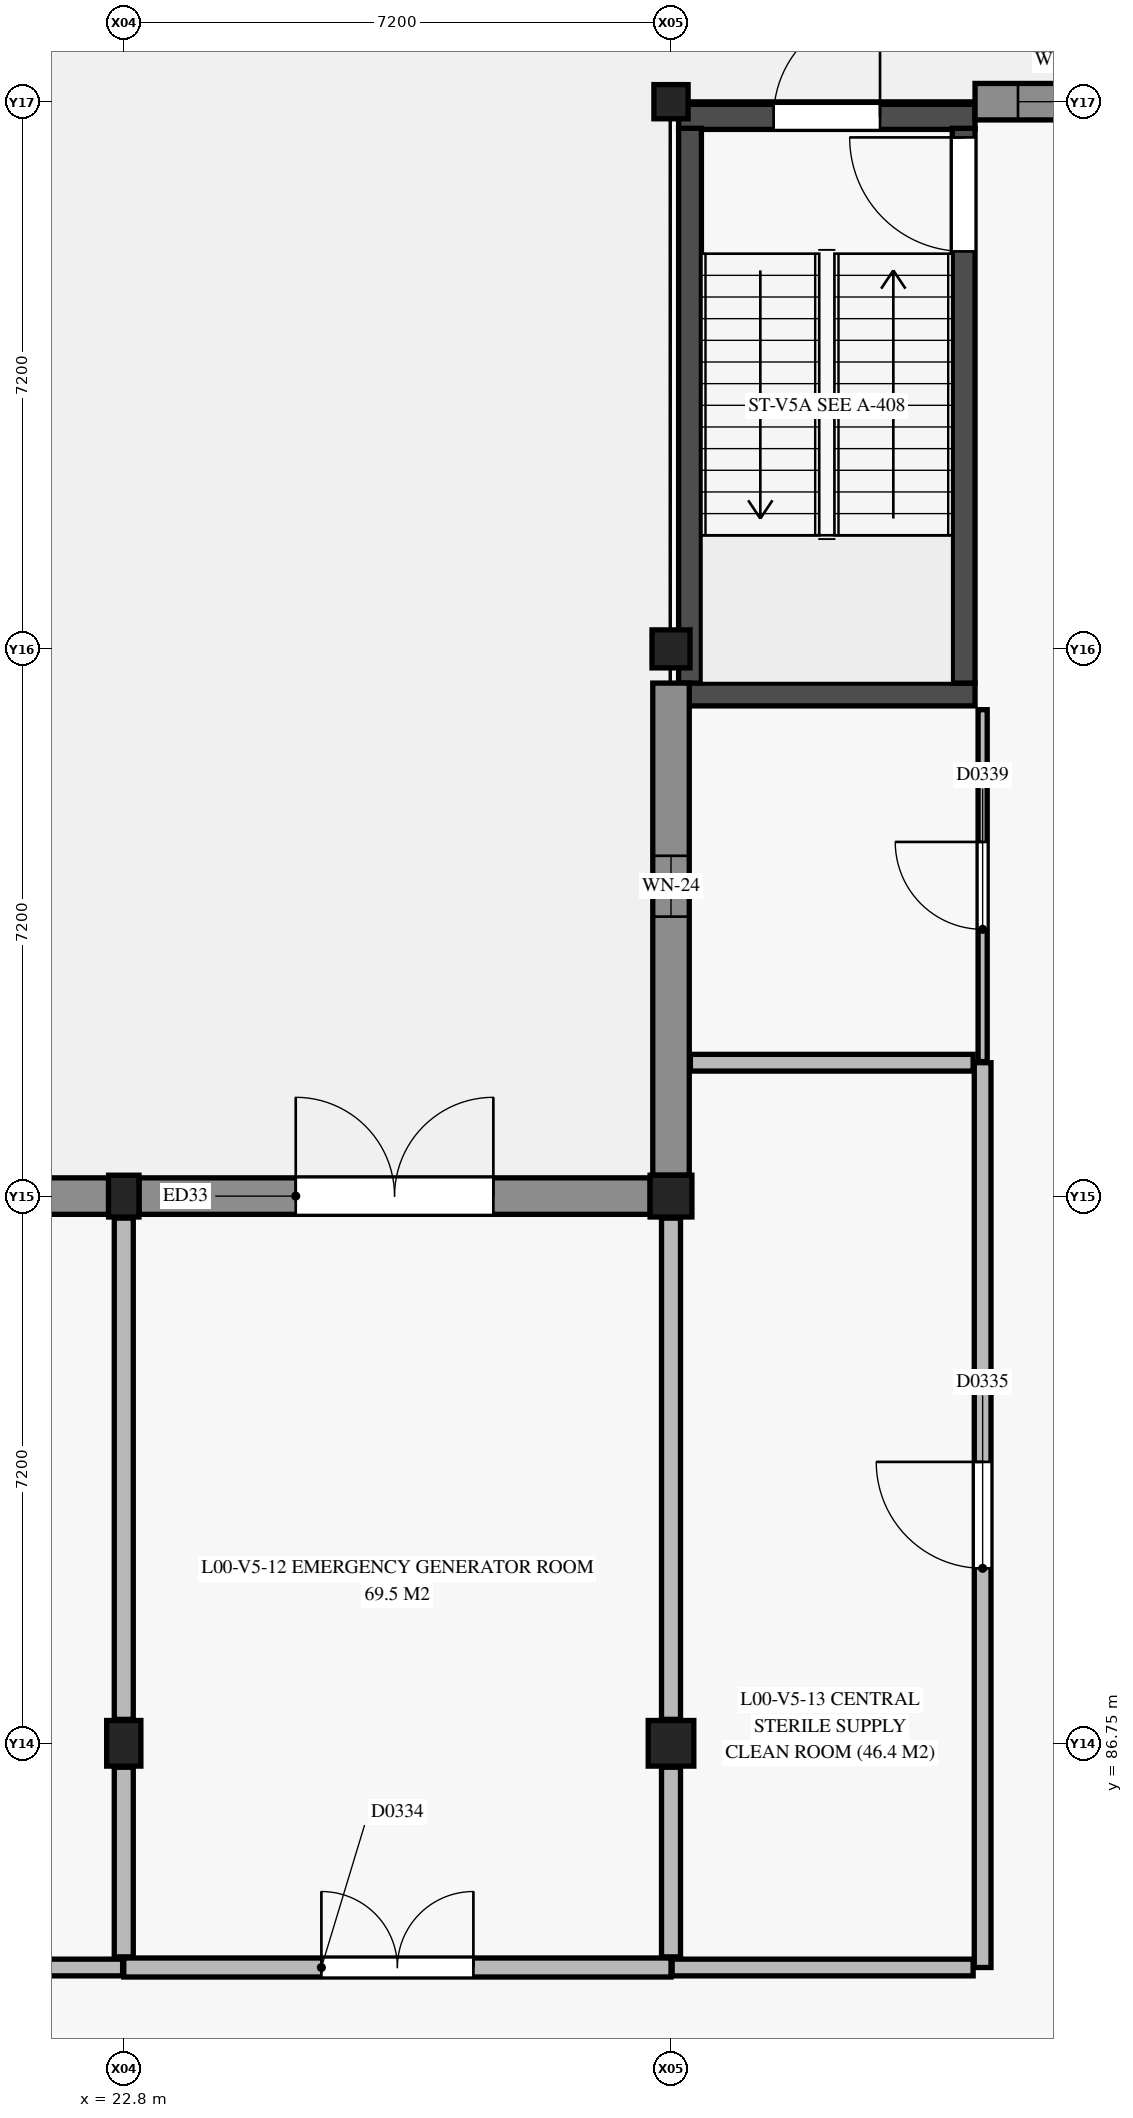
"""IFC4 building model, lengths in metres.
Left out: names, types, materials, properties, quantities, classifications, styles, units other than length and angle.
Written with IfcOpenShell. Run it as: python <this file> out.ifc"""

import sys

from ifc_helpers import new_model, si_unit, direction, frame, frame_2d, origin, origin_2d, place, context, subcontext, project, spatial, rectangle, extrude, element, fill, save


model = new_model("IFC4")
c1 = context("Model", 3, precision=1e-05, world=origin(), true_north=direction((0.0, 1.0)))
c2 = subcontext(c1, "Body", "Model", "MODEL_VIEW")
j1 = project(units=[si_unit("LENGTHUNIT", "METRE"), si_unit("PLANEANGLEUNIT", "RADIAN")], contexts=[c1])
p1 = place(None, origin())
s1 = spatial("IfcSite", under=j1, at=p1, CompositionType="ELEMENT")
p2 = place(p1, origin())
s2 = spatial("IfcBuilding", under=s1, at=p2, CompositionType="ELEMENT")
p3 = place(p2, origin())
s3 = spatial("IfcBuildingStorey", under=s2, at=p3, CompositionType="ELEMENT", Elevation=0.0)
p4 = place(p3, frame((22.8, 86.75, 0.0), z_axis=(0.0, 0.0, 1.0), x_axis=(1.0, 0.0, 0.0)))
e1 = element("IfcColumn", 1, at=p4, inside=s3, PredefinedType="COLUMN", context=c2, shape_type="SweptSolid", body=[
    extrude(rectangle(XDim=0.45, YDim=0.6, at=origin_2d()), origin(), (0.0, 0.0, 1.0), 4.8),
])
p5 = place(p3, frame((22.8, 93.95, 0.0), z_axis=(0.0, 0.0, 1.0), x_axis=(1.0, 0.0, 0.0)))
e2 = element("IfcColumn", 2, at=p5, inside=s3, PredefinedType="COLUMN", context=c2, shape_type="SweptSolid", body=[
    extrude(rectangle(XDim=0.4, YDim=0.55, at=origin_2d()), origin(), (0.0, 0.0, 1.0), 4.8),
])
p6 = place(p3, frame((30.0, 86.75, 0.0), z_axis=(0.0, 0.0, 1.0), x_axis=(1.0, 0.0, 0.0)))
e3 = element("IfcColumn", 3, at=p6, inside=s3, PredefinedType="COLUMN", context=c2, shape_type="SweptSolid", body=[
    extrude(rectangle(XDim=0.6, YDim=0.6, at=origin_2d()), origin(), (0.0, 0.0, 1.0), 4.8),
])
p7 = place(p3, frame((30.0, 93.95, 0.0), z_axis=(0.0, 0.0, 1.0), x_axis=(1.0, 0.0, 0.0)))
e4 = element("IfcColumn", 4, at=p7, inside=s3, PredefinedType="COLUMN", context=c2, shape_type="SweptSolid", body=[
    extrude(rectangle(XDim=0.55, YDim=0.55, at=origin_2d()), origin(), (0.0, 0.0, 1.0), 4.8),
])
p8 = place(p3, frame((30.0, 101.15, 0.0), z_axis=(0.0, 0.0, 1.0), x_axis=(1.0, 0.0, 0.0)))
e5 = element("IfcColumn", 5, at=p8, inside=s3, PredefinedType="COLUMN", context=c2, shape_type="SweptSolid", body=[
    extrude(rectangle(XDim=0.5, YDim=0.5, at=origin_2d()), origin(), (0.0, 0.0, 1.0), 4.8),
])
p9 = place(p3, frame((30.0, 108.35, 0.0), z_axis=(0.0, 0.0, 1.0), x_axis=(1.0, 0.0, 0.0)))
e6 = element("IfcColumn", 6, at=p9, inside=s3, PredefinedType="COLUMN", context=c2, shape_type="SweptSolid", body=[
    extrude(rectangle(XDim=0.45, YDim=0.45, at=origin_2d()), origin(), (0.0, 0.0, 1.0), 4.8),
])
p10 = place(p3, frame((30.1, 100.55, 0.0), z_axis=(0.0, 0.0, 1.0), x_axis=(1.0, 0.0, 0.0)))
e7 = element("IfcWall", 7, at=p10, inside=s3, PredefinedType="SHEAR", context=c2, shape_type="SweptSolid", body=[
    extrude(rectangle(XDim=3.9, YDim=0.3, at=frame_2d((1.95, 0.0))), origin(), (0.0, 0.0, 1.0), 4.52),
])
p11 = place(p3, frame((30.1, 108.15, 0.0), z_axis=(0.0, 0.0, 1.0), x_axis=(1.0, 0.0, 0.0)))
e8 = element("IfcWall", 8, at=p11, inside=s3, PredefinedType="SHEAR", context=c2, shape_type="SweptSolid", body=[
    extrude(rectangle(XDim=3.9, YDim=0.33, at=frame_2d((1.95, 0.0))), origin(), (0.0, 0.0, 1.0), 4.52),
])
p12 = place(p11, frame((1.25, 0.0, 0.0)))
e9 = element("IfcOpeningElement", 9, at=p12, cuts=e8, PredefinedType="OPENING", context=c2, shape_type="SweptSolid", body=[
    extrude(rectangle(XDim=1.4, YDim=2.25, at=frame_2d((0.7, 1.125))), frame((0.0, 0.175, 0.0), z_axis=(0.0, -1.0, 0.0), x_axis=(1.0, 0.0, 0.0)), (0.0, 0.0, 1.0), 0.35),
])
p13 = place(p3, frame((30.25, 100.7, 0.0), z_axis=(0.0, 0.0, 1.0), x_axis=(0.0, 1.0, 0.0)))
e10 = element("IfcWall", 10, at=p13, inside=s3, PredefinedType="SHEAR", context=c2, shape_type="SweptSolid", body=[
    extrude(rectangle(XDim=7.3, YDim=0.3, at=frame_2d((3.65, 0.0))), origin(), (0.0, 0.0, 1.0), 4.52),
])
p14 = place(p3, frame((33.85, 100.7, 0.0), z_axis=(0.0, 0.0, 1.0), x_axis=(0.0, 1.0, 0.0)))
e11 = element("IfcWall", 11, at=p14, inside=s3, PredefinedType="SHEAR", context=c2, shape_type="SweptSolid", body=[
    extrude(rectangle(XDim=7.3, YDim=0.3, at=frame_2d((3.65, 0.0))), origin(), (0.0, 0.0, 1.0), 4.52),
])
p15 = place(p14, frame((5.68, 0.0, 0.0)))
e12 = element("IfcOpeningElement", 12, at=p15, cuts=e11, PredefinedType="OPENING", context=c2, shape_type="SweptSolid", body=[
    extrude(rectangle(XDim=1.5, YDim=2.15, at=frame_2d((0.75, 1.075))), frame((0.0, 0.16, 0.0), z_axis=(0.0, -1.0, 0.0), x_axis=(1.0, 0.0, 0.0)), (0.0, 0.0, 1.0), 0.32),
])
p16 = place(p3, frame((15.825, 93.95, 0.0), z_axis=(0.0, 0.0, 1.0), x_axis=(1.0, 0.0, 0.0)))
e13 = element("IfcWall", 13, at=p16, inside=s3, PredefinedType="SOLIDWALL", context=c2, shape_type="SweptSolid", body=[
    extrude(rectangle(XDim=6.775, YDim=0.48, at=frame_2d((3.388, 0.0))), origin(), (0.0, 0.0, 1.0), 3.7),
])
p17 = place(p16, frame((2.188, 0.0, 0.9)))
e14 = element("IfcOpeningElement", 14, at=p17, cuts=e13, PredefinedType="OPENING", context=c2, shape_type="SweptSolid", body=[
    extrude(rectangle(XDim=2.4, YDim=0.9, at=frame_2d((1.2, 0.45))), frame((0.0, 0.25, 0.0), z_axis=(0.0, -1.0, 0.0), x_axis=(1.0, 0.0, 0.0)), (0.0, 0.0, 1.0), 0.5),
])
p18 = place(p3, frame((23.0, 93.95, 0.0), z_axis=(0.0, 0.0, 1.0), x_axis=(1.0, 0.0, 0.0)))
e15 = element("IfcWall", 15, at=p18, inside=s3, PredefinedType="SOLIDWALL", context=c2, shape_type="SweptSolid", body=[
    extrude(rectangle(XDim=6.725, YDim=0.48, at=frame_2d((3.363, 0.0))), origin(), (0.0, 0.0, 1.0), 3.7),
])
p19 = place(p18, frame((2.062, 0.0, 0.0)))
e16 = element("IfcOpeningElement", 16, at=p19, cuts=e15, PredefinedType="OPENING", context=c2, shape_type="SweptSolid", body=[
    extrude(rectangle(XDim=2.6, YDim=2.7, at=frame_2d((1.3, 1.35))), frame((0.0, 0.25, 0.0), z_axis=(0.0, -1.0, 0.0), x_axis=(1.0, 0.0, 0.0)), (0.0, 0.0, 1.0), 0.5),
])
p20 = place(p3, frame((30.0, 94.225, 0.0), z_axis=(0.0, 0.0, 1.0), x_axis=(0.0, 1.0, 0.0)))
e17 = element("IfcWall", 17, at=p20, inside=s3, PredefinedType="SOLIDWALL", context=c2, shape_type="SweptSolid", body=[
    extrude(rectangle(XDim=6.475, YDim=0.48, at=frame_2d((3.237, 0.0))), origin(), (0.0, 0.0, 1.0), 3.7),
])
p21 = place(p20, frame((3.403, 0.0, 0.6)))
e18 = element("IfcOpeningElement", 18, at=p21, cuts=e17, PredefinedType="OPENING", context=c2, shape_type="SweptSolid", body=[
    extrude(rectangle(XDim=0.8, YDim=2.6, at=frame_2d((0.4, 1.3))), frame((0.0, 0.25, 0.0), z_axis=(0.0, -1.0, 0.0), x_axis=(1.0, 0.0, 0.0)), (0.0, 0.0, 1.0), 0.5),
])
p22 = place(p3, frame((34.0, 108.35, 0.0), z_axis=(0.0, 0.0, 1.0), x_axis=(1.0, 0.0, 0.0)))
e19 = element("IfcWall", 19, at=p22, inside=s3, PredefinedType="SOLIDWALL", context=c2, shape_type="SweptSolid", body=[
    extrude(rectangle(XDim=2.85, YDim=0.48, at=frame_2d((1.425, 0.0))), origin(), (0.0, 0.0, 1.0), 3.7),
])
p23 = place(p22, frame((0.565, 0.0, 0.9)))
e20 = element("IfcOpeningElement", 20, at=p23, cuts=e19, PredefinedType="OPENING", context=c2, shape_type="SweptSolid", body=[
    extrude(rectangle(XDim=1.2, YDim=1.5, at=frame_2d((0.6, 0.75))), frame((0.0, 0.25, 0.0), z_axis=(0.0, -1.0, 0.0), x_axis=(1.0, 0.0, 0.0)), (0.0, 0.0, 1.0), 0.5),
])
p24 = place(p3, frame((22.8, 83.8, 0.0), z_axis=(0.0, 0.0, 1.0), x_axis=(1.0, 0.0, 0.0)))
e21 = element("IfcWall", 21, at=p24, inside=s3, PredefinedType="PARTITIONING", context=c2, shape_type="SweptSolid", body=[
    extrude(rectangle(XDim=7.2, YDim=0.25, at=frame_2d((3.6, 0.0))), origin(), (0.0, 0.0, 1.0), 3.805),
])
p25 = place(p24, frame((2.6, 0.0, 0.0)))
e22 = element("IfcOpeningElement", 22, at=p25, cuts=e21, PredefinedType="OPENING", context=c2, shape_type="SweptSolid", body=[
    extrude(rectangle(XDim=2.0, YDim=2.4, at=frame_2d((1.0, 1.2))), frame((0.0, 0.135, 0.0), z_axis=(0.0, -1.0, 0.0), x_axis=(1.0, 0.0, 0.0)), (0.0, 0.0, 1.0), 0.27),
])
p26 = place(p3, frame((18.0, 83.8, 0.0), z_axis=(0.0, 0.0, 1.0), x_axis=(1.0, 0.0, 0.0)))
e23 = element("IfcWall", 23, at=p26, inside=s3, PredefinedType="PARTITIONING", context=c2, shape_type="SweptSolid", body=[
    extrude(rectangle(XDim=4.785, YDim=0.22, at=frame_2d((2.393, 0.0))), origin(), (0.0, 0.0, 1.0), 3.955),
])
p27 = place(p26, frame((1.692, 0.0, 0.0)))
e24 = element("IfcOpeningElement", 24, at=p27, cuts=e23, PredefinedType="OPENING", context=c2, shape_type="SweptSolid", body=[
    extrude(rectangle(XDim=1.4, YDim=2.2, at=frame_2d((0.7, 1.1))), frame((0.0, 0.12, 0.0), z_axis=(0.0, -1.0, 0.0), x_axis=(1.0, 0.0, 0.0)), (0.0, 0.0, 1.0), 0.24),
])
p28 = place(p3, frame((34.1, 83.8, 0.0), z_axis=(0.0, 0.0, 1.0), x_axis=(0.0, 1.0, 0.0)))
e25 = element("IfcWall", 25, at=p28, inside=s3, PredefinedType="PARTITIONING", context=c2, shape_type="SweptSolid", body=[
    extrude(rectangle(XDim=11.905, YDim=0.22, at=frame_2d((5.953, 0.0))), origin(), (0.0, 0.0, 1.0), 3.925),
])
p29 = place(p28, frame((5.252, 0.0, 0.0)))
e26 = element("IfcOpeningElement", 26, at=p29, cuts=e25, PredefinedType="OPENING", context=c2, shape_type="SweptSolid", body=[
    extrude(rectangle(XDim=1.4, YDim=2.2, at=frame_2d((0.7, 1.1))), frame((0.0, 0.12, 0.0), z_axis=(0.0, -1.0, 0.0), x_axis=(1.0, 0.0, 0.0)), (0.0, 0.0, 1.0), 0.24),
])
p30 = place(p3, frame((30.015, 83.8, 0.0), z_axis=(0.0, 0.0, 1.0), x_axis=(1.0, 0.0, 0.0)))
e27 = element("IfcWall", 27, at=p30, inside=s3, PredefinedType="PARTITIONING", context=c2, shape_type="SweptSolid", body=[
    extrude(rectangle(XDim=3.96, YDim=0.22, at=frame_2d((1.98, 0.0))), origin(), (0.0, 0.0, 1.0), 3.805),
])
p31 = place(p3, frame((34.1, 95.72, 0.0), z_axis=(0.0, 0.0, 1.0), x_axis=(0.0, 1.0, 0.0)))
e28 = element("IfcWall", 28, at=p31, inside=s3, PredefinedType="PARTITIONING", context=c2, shape_type="SweptSolid", body=[
    extrude(rectangle(XDim=4.63, YDim=0.12, at=frame_2d((2.315, 0.0))), origin(), (0.0, 0.0, 1.0), 4.045),
])
p32 = place(p31, frame((1.74, 0.0, 0.0)))
e29 = element("IfcOpeningElement", 29, at=p32, cuts=e28, PredefinedType="OPENING", context=c2, shape_type="SweptSolid", body=[
    extrude(rectangle(XDim=1.15, YDim=2.15, at=frame_2d((0.575, 1.075))), frame((0.0, 0.07, 0.0), z_axis=(0.0, -1.0, 0.0), x_axis=(1.0, 0.0, 0.0)), (0.0, 0.0, 1.0), 0.14),
])
p33 = place(p3, frame((22.8, 83.94, 0.0), z_axis=(0.0, 0.0, 1.0), x_axis=(0.0, 1.0, 0.0)))
e30 = element("IfcWall", 30, at=p33, inside=s3, PredefinedType="PARTITIONING", context=c2, shape_type="SweptSolid", body=[
    extrude(rectangle(XDim=2.495, YDim=0.25, at=frame_2d((1.248, 0.0))), origin(), (0.0, 0.0, 1.0), 3.955),
])
p34 = place(p3, frame((22.8, 87.065, 0.0), z_axis=(0.0, 0.0, 1.0), x_axis=(0.0, 1.0, 0.0)))
e31 = element("IfcWall", 31, at=p34, inside=s3, PredefinedType="PARTITIONING", context=c2, shape_type="SweptSolid", body=[
    extrude(rectangle(XDim=6.595, YDim=0.25, at=frame_2d((3.297, 0.0))), origin(), (0.0, 0.0, 1.0), 3.705),
])
p35 = place(p3, frame((30.0, 83.94, 0.0), z_axis=(0.0, 0.0, 1.0), x_axis=(0.0, 1.0, 0.0)))
e32 = element("IfcWall", 32, at=p35, inside=s3, PredefinedType="PARTITIONING", context=c2, shape_type="SweptSolid", body=[
    extrude(rectangle(XDim=2.495, YDim=0.25, at=frame_2d((1.248, 0.0))), origin(), (0.0, 0.0, 1.0), 3.805),
])
p36 = place(p3, frame((30.0, 87.065, 0.0), z_axis=(0.0, 0.0, 1.0), x_axis=(0.0, 1.0, 0.0)))
e33 = element("IfcWall", 33, at=p36, inside=s3, PredefinedType="PARTITIONING", context=c2, shape_type="SweptSolid", body=[
    extrude(rectangle(XDim=6.595, YDim=0.25, at=frame_2d((3.297, 0.0))), origin(), (0.0, 0.0, 1.0), 3.925),
])
p37 = place(p3, frame((30.255, 95.705, 0.0), z_axis=(0.0, 0.0, 1.0), x_axis=(1.0, 0.0, 0.0)))
e34 = element("IfcWall", 34, at=p37, inside=s3, PredefinedType="PARTITIONING", context=c2, shape_type="SweptSolid", body=[
    extrude(rectangle(XDim=3.72, YDim=0.22, at=frame_2d((1.86, 0.0))), origin(), (0.0, 0.0, 1.0), 4.52),
])
p38 = place(p12, origin())
e35 = element("IfcDoor", 35, at=p38, inside=s3, OperationType="SINGLE_SWING_RIGHT", PredefinedType="DOOR", context=c2, shape_type="SweptSolid", body=[
    extrude(rectangle(XDim=1.4, YDim=2.25, at=frame_2d((0.7, 1.125))), frame((0.0, 0.025, 0.0), z_axis=(0.0, -1.0, 0.0), x_axis=(1.0, 0.0, 0.0)), (0.0, 0.0, 1.0), 0.05),
])
fill(e9, e35)
p39 = place(p19, origin())
e36 = element("IfcDoor", 36, at=p39, inside=s3, OperationType="DOUBLE_DOOR_SINGLE_SWING", PredefinedType="DOOR", context=c2, shape_type="SweptSolid", body=[
    extrude(rectangle(XDim=2.6, YDim=2.7, at=frame_2d((1.3, 1.35))), frame((0.0, 0.025, 0.0), z_axis=(0.0, -1.0, 0.0), x_axis=(1.0, 0.0, 0.0)), (0.0, 0.0, 1.0), 0.05),
])
fill(e16, e36)
p40 = place(p21, origin())
e37 = element("IfcWindow", 37, at=p40, inside=s3, PartitioningType="SINGLE_PANEL", PredefinedType="WINDOW", context=c2, shape_type="SweptSolid", body=[
    extrude(rectangle(XDim=0.8, YDim=2.6, at=frame_2d((0.4, 1.3))), frame((0.0, 0.03, 0.0), z_axis=(0.0, -1.0, 0.0), x_axis=(1.0, 0.0, 0.0)), (0.0, 0.0, 1.0), 0.06),
])
fill(e18, e37)
p41 = place(p23, origin())
e38 = element("IfcWindow", 38, at=p41, inside=s3, PartitioningType="SINGLE_PANEL", PredefinedType="WINDOW", context=c2, shape_type="SweptSolid", body=[
    extrude(rectangle(XDim=1.2, YDim=1.5, at=frame_2d((0.6, 0.75))), frame((0.0, 0.03, 0.0), z_axis=(0.0, -1.0, 0.0), x_axis=(1.0, 0.0, 0.0)), (0.0, 0.0, 1.0), 0.06),
])
fill(e20, e38)
p42 = place(p15, origin())
e39 = element("IfcDoor", 39, at=p42, inside=s3, OperationType="SINGLE_SWING_RIGHT", PredefinedType="DOOR", context=c2, shape_type="SweptSolid", body=[
    extrude(rectangle(XDim=1.5, YDim=2.15, at=frame_2d((0.75, 1.075))), frame((0.0, 0.025, 0.0), z_axis=(0.0, -1.0, 0.0), x_axis=(1.0, 0.0, 0.0)), (0.0, 0.0, 1.0), 0.05),
])
fill(e12, e39)
p43 = place(p25, origin())
e40 = element("IfcDoor", 40, at=p43, inside=s3, OperationType="DOUBLE_DOOR_SINGLE_SWING", PredefinedType="DOOR", context=c2, shape_type="SweptSolid", body=[
    extrude(rectangle(XDim=2.0, YDim=2.4, at=frame_2d((1.0, 1.2))), frame((0.0, 0.025, 0.0), z_axis=(0.0, -1.0, 0.0), x_axis=(1.0, 0.0, 0.0)), (0.0, 0.0, 1.0), 0.05),
])
fill(e22, e40)
p44 = place(p29, origin())
e41 = element("IfcDoor", 41, at=p44, inside=s3, OperationType="SINGLE_SWING_RIGHT", PredefinedType="DOOR", context=c2, shape_type="SweptSolid", body=[
    extrude(rectangle(XDim=1.4, YDim=2.2, at=frame_2d((0.7, 1.1))), frame((0.0, 0.025, 0.0), z_axis=(0.0, -1.0, 0.0), x_axis=(1.0, 0.0, 0.0)), (0.0, 0.0, 1.0), 0.05),
])
fill(e26, e41)
p45 = place(p32, origin())
e42 = element("IfcDoor", 42, at=p45, inside=s3, OperationType="SINGLE_SWING_RIGHT", PredefinedType="DOOR", context=c2, shape_type="SweptSolid", body=[
    extrude(rectangle(XDim=1.15, YDim=2.15, at=frame_2d((0.575, 1.075))), frame((0.0, 0.025, 0.0), z_axis=(0.0, -1.0, 0.0), x_axis=(1.0, 0.0, 0.0)), (0.0, 0.0, 1.0), 0.05),
])
fill(e29, e42)
save(model, sys.argv[1])
